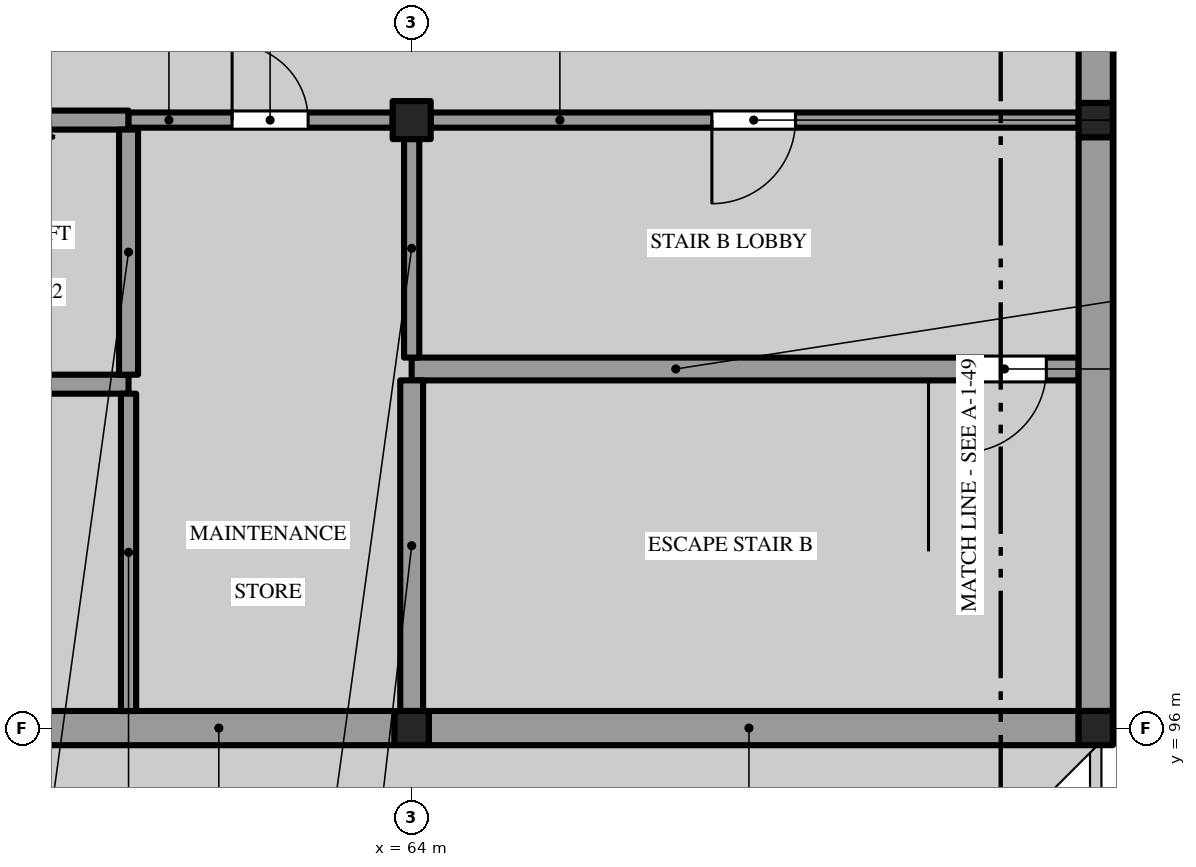
"""IFC4 building model, lengths in metres.
Left out: names, types, materials, properties, quantities, classifications, styles, units other than length and angle.
Written with IfcOpenShell. Run it as: python <this file> out.ifc"""

import sys

from ifc_helpers import new_model, si_unit, direction, frame, frame_2d, origin, origin_2d, place, context, subcontext, project, spatial, polyline, rectangle, outline, extrude, element, fill, save


model = new_model("IFC4")
c1 = context("Model", 3, precision=1e-05, world=origin(), true_north=direction((0.0, 1.0)))
c2 = subcontext(c1, "Body", "Model", "MODEL_VIEW")
j1 = project(units=[si_unit("LENGTHUNIT", "METRE"), si_unit("PLANEANGLEUNIT", "RADIAN")], contexts=[c1])
p1 = place(None, origin())
s1 = spatial("IfcSite", under=j1, at=p1, CompositionType="ELEMENT")
p2 = place(p1, origin())
s2 = spatial("IfcBuilding", under=s1, at=p2, CompositionType="ELEMENT")
p3 = place(p2, frame((0.0, 0.0, 12.0)))
s3 = spatial("IfcBuildingStorey", under=s2, at=p3, CompositionType="ELEMENT", Elevation=12.0)
p4 = place(p3, frame((64.0, 96.0, 0.0), z_axis=(0.0, 0.0, 1.0), x_axis=(1.0, 0.0, 0.0)))
e1 = element("IfcColumn", 1, at=p4, inside=s3, PredefinedType="COLUMN", context=c2, shape_type="SweptSolid", body=[
    extrude(rectangle(XDim=0.45, YDim=0.45, at=origin_2d()), origin(), (0.0, 0.0, 1.0), 4.838),
])
p5 = place(p3, frame((64.0, 104.0, 0.0), z_axis=(0.0, 0.0, 1.0), x_axis=(1.0, 0.0, 0.0)))
e2 = element("IfcColumn", 2, at=p5, inside=s3, PredefinedType="COLUMN", context=c2, shape_type="SweptSolid", body=[
    extrude(rectangle(XDim=0.5, YDim=0.5, at=origin_2d()), origin(), (0.0, 0.0, 1.0), 7.072),
])
p6 = place(p3, frame((73.0, 96.0, 0.0), z_axis=(0.0, 0.0, 1.0), x_axis=(1.0, 0.0, 0.0)))
e3 = element("IfcColumn", 3, at=p6, inside=s3, PredefinedType="COLUMN", context=c2, shape_type="SweptSolid", body=[
    extrude(rectangle(XDim=0.45, YDim=0.45, at=origin_2d()), origin(), (0.0, 0.0, 1.0), 4.838),
])
p7 = place(p3, frame((73.0, 104.0, 0.0), z_axis=(0.0, 0.0, 1.0), x_axis=(1.0, 0.0, 0.0)))
e4 = element("IfcColumn", 4, at=p7, inside=s3, PredefinedType="COLUMN", context=c2, shape_type="SweptSolid", body=[
    extrude(rectangle(XDim=0.45, YDim=0.45, at=origin_2d()), origin(), (0.0, 0.0, 1.0), 7.072),
])
p8 = place(p3, frame((55.225, 96.0, 0.0), z_axis=(0.0, 0.0, 1.0), x_axis=(1.0, 0.0, 0.0)))
e5 = element("IfcWall", 5, at=p8, inside=s3, PredefinedType="SOLIDWALL", context=c2, shape_type="SweptSolid", body=[
    extrude(rectangle(XDim=8.55, YDim=0.45, at=frame_2d((4.275, 0.0))), origin(), (0.0, 0.0, 1.0), 4.688),
])
p9 = place(p8, frame((0.425, 0.0, 1.1)))
e6 = element("IfcOpeningElement", 6, at=p9, cuts=e5, PredefinedType="OPENING", context=c2, shape_type="SweptSolid", body=[
    extrude(rectangle(XDim=3.2, YDim=1.5, at=frame_2d((1.6, 0.75))), frame((0.0, 0.235, 0.0), z_axis=(0.0, -1.0, 0.0), x_axis=(1.0, 0.0, 0.0)), (0.0, 0.0, 1.0), 0.47),
])
p10 = place(p3, frame((64.225, 96.0, 0.0), z_axis=(0.0, 0.0, 1.0), x_axis=(1.0, 0.0, 0.0)))
e7 = element("IfcWall", 7, at=p10, inside=s3, PredefinedType="SOLIDWALL", context=c2, shape_type="SweptSolid", body=[
    extrude(rectangle(XDim=8.55, YDim=0.45, at=frame_2d((4.275, 0.0))), origin(), (0.0, 0.0, 1.0), 4.688),
])
p11 = place(p3, frame((57.125, 100.525, 0.0), z_axis=(0.0, 0.0, 1.0), x_axis=(1.0, 0.0, 0.0)))
e8 = element("IfcWall", 8, at=p11, inside=s3, PredefinedType="SOLIDWALL", context=c2, shape_type="SweptSolid", body=[
    extrude(rectangle(XDim=3.15, YDim=0.25, at=frame_2d((1.575, 0.0))), origin(), (0.0, 0.0, 1.0), 5.985),
])
p12 = place(p3, frame((64.0, 100.725, 0.0), z_axis=(0.0, 0.0, 1.0), x_axis=(1.0, 0.0, 0.0)))
e9 = element("IfcWall", 9, at=p12, inside=s3, PredefinedType="SHEAR", context=c2, shape_type="SweptSolid", body=[
    extrude(rectangle(XDim=8.775, YDim=0.3, at=frame_2d((4.387, 0.0))), origin(), (0.0, 0.0, 1.0), 6.043),
])
p13 = place(p12, frame((7.25, 0.0, 0.0)))
e10 = element("IfcOpeningElement", 10, at=p13, cuts=e9, PredefinedType="OPENING", context=c2, shape_type="SweptSolid", body=[
    extrude(rectangle(XDim=1.1, YDim=2.1, at=frame_2d((0.55, 1.05))), frame((0.0, 0.16, 0.0), z_axis=(0.0, -1.0, 0.0), x_axis=(1.0, 0.0, 0.0)), (0.0, 0.0, 1.0), 0.32),
])
p14 = place(p3, frame((57.125, 104.0, 0.0), z_axis=(0.0, 0.0, 1.0), x_axis=(1.0, 0.0, 0.0)))
e11 = element("IfcWall", 11, at=p14, inside=s3, PredefinedType="SOLIDWALL", context=c2, shape_type="SweptSolid", body=[
    extrude(rectangle(XDim=3.15, YDim=0.25, at=frame_2d((1.575, 0.0))), origin(), (0.0, 0.0, 1.0), 6.922),
])
p15 = place(p14, frame((1.025, 0.0, 0.0)))
e12 = element("IfcOpeningElement", 12, at=p15, cuts=e11, PredefinedType="OPENING", context=c2, shape_type="SweptSolid", body=[
    extrude(rectangle(XDim=1.1, YDim=2.1, at=frame_2d((0.55, 1.05))), frame((0.0, 0.135, 0.0), z_axis=(0.0, -1.0, 0.0), x_axis=(1.0, 0.0, 0.0)), (0.0, 0.0, 1.0), 0.27),
])
p16 = place(p3, frame((60.275, 104.0, 0.0), z_axis=(0.0, 0.0, 1.0), x_axis=(1.0, 0.0, 0.0)))
e13 = element("IfcWall", 13, at=p16, inside=s3, PredefinedType="SOLIDWALL", context=c2, shape_type="SweptSolid", body=[
    extrude(rectangle(XDim=3.475, YDim=0.2, at=frame_2d((1.738, 0.0))), origin(), (0.0, 0.0, 1.0), 6.922),
])
p17 = place(p16, frame((1.363, 0.0, 0.0)))
e14 = element("IfcOpeningElement", 14, at=p17, cuts=e13, PredefinedType="OPENING", context=c2, shape_type="SweptSolid", body=[
    extrude(rectangle(XDim=1.0, YDim=2.1, at=frame_2d((0.5, 1.05))), frame((0.0, 0.11, 0.0), z_axis=(0.0, -1.0, 0.0), x_axis=(1.0, 0.0, 0.0)), (0.0, 0.0, 1.0), 0.22),
])
p18 = place(p3, frame((64.25, 104.0, 0.0), z_axis=(0.0, 0.0, 1.0), x_axis=(1.0, 0.0, 0.0)))
e15 = element("IfcWall", 15, at=p18, inside=s3, PredefinedType="SOLIDWALL", context=c2, shape_type="SweptSolid", body=[
    extrude(rectangle(XDim=8.525, YDim=0.2, at=frame_2d((4.262, 0.0))), origin(), (0.0, 0.0, 1.0), 6.922),
])
p19 = place(p18, frame((3.7, 0.0, 0.0)))
e16 = element("IfcOpeningElement", 16, at=p19, cuts=e15, PredefinedType="OPENING", context=c2, shape_type="SweptSolid", body=[
    extrude(rectangle(XDim=1.1, YDim=2.1, at=frame_2d((0.55, 1.05))), frame((0.0, 0.11, 0.0), z_axis=(0.0, -1.0, 0.0), x_axis=(1.0, 0.0, 0.0)), (0.0, 0.0, 1.0), 0.22),
])
p20 = place(p3, frame((60.275, 96.225, 0.0), z_axis=(0.0, 0.0, 1.0), x_axis=(0.0, 1.0, 0.0)))
e17 = element("IfcWall", 17, at=p20, inside=s3, PredefinedType="SOLIDWALL", context=c2, shape_type="SweptSolid", body=[
    extrude(outline(polyline([(0.0, 0.0), (4.175, 0.0), (4.175, 5.95), (0.0, 4.752), (0.0, 0.0)])), frame((0.0, 0.1, 0.0), z_axis=(0.0, -1.0, 0.0), x_axis=(1.0, 0.0, 0.0)), (0.0, 0.0, 1.0), 0.2),
])
p21 = place(p3, frame((60.275, 100.65, 0.0), z_axis=(0.0, 0.0, 1.0), x_axis=(0.0, 1.0, 0.0)))
e18 = element("IfcWall", 18, at=p21, inside=s3, PredefinedType="SOLIDWALL", context=c2, shape_type="SweptSolid", body=[
    extrude(outline(polyline([(0.0, 0.0), (3.225, 0.0), (3.225, 6.946), (0.0, 6.021), (0.0, 0.0)])), frame((0.0, 0.125, 0.0), z_axis=(0.0, -1.0, 0.0), x_axis=(1.0, 0.0, 0.0)), (0.0, 0.0, 1.0), 0.25),
])
p22 = place(p3, frame((64.0, 96.225, 0.0), z_axis=(0.0, 0.0, 1.0), x_axis=(0.0, 1.0, 0.0)))
e19 = element("IfcWall", 19, at=p22, inside=s3, PredefinedType="SHEAR", context=c2, shape_type="SweptSolid", body=[
    extrude(outline(polyline([(0.0, 0.0), (4.35, 0.0), (4.35, 6.0), (0.0, 4.752), (0.0, 0.0)])), frame((0.0, 0.15, 0.0), z_axis=(0.0, -1.0, 0.0), x_axis=(1.0, 0.0, 0.0)), (0.0, 0.0, 1.0), 0.3),
])
p23 = place(p3, frame((64.0, 100.875, 0.0), z_axis=(0.0, 0.0, 1.0), x_axis=(0.0, 1.0, 0.0)))
e20 = element("IfcWall", 20, at=p23, inside=s3, PredefinedType="SOLIDWALL", context=c2, shape_type="SweptSolid", body=[
    extrude(outline(polyline([(0.0, 0.0), (2.875, 0.0), (2.875, 6.91), (0.0, 6.086), (0.0, 0.0)])), frame((0.0, 0.1, 0.0), z_axis=(0.0, -1.0, 0.0), x_axis=(1.0, 0.0, 0.0)), (0.0, 0.0, 1.0), 0.2),
])
p24 = place(p3, frame((73.0, 96.225, 0.0), z_axis=(0.0, 0.0, 1.0), x_axis=(0.0, 1.0, 0.0)))
e21 = element("IfcWall", 21, at=p24, inside=s3, PredefinedType="SOLIDWALL", context=c2, shape_type="SweptSolid", body=[
    extrude(outline(polyline([(0.0, 0.0), (7.55, 0.0), (7.55, 6.917), (0.0, 4.752), (0.0, 0.0)])), frame((0.0, 0.225, 0.0), z_axis=(0.0, -1.0, 0.0), x_axis=(1.0, 0.0, 0.0)), (0.0, 0.0, 1.0), 0.45),
])
p25 = place(p3, frame((73.0, 104.225, 0.0), z_axis=(0.0, 0.0, 1.0), x_axis=(0.0, 1.0, 0.0)))
e22 = element("IfcWall", 22, at=p25, inside=s3, PredefinedType="SOLIDWALL", context=c2, shape_type="SweptSolid", body=[
    extrude(outline(polyline([(0.0, 0.0), (7.55, 0.0), (7.55, 4.752), (0.0, 6.917), (0.0, 0.0)])), frame((0.0, 0.225, 0.0), z_axis=(0.0, -1.0, 0.0), x_axis=(1.0, 0.0, 0.0)), (0.0, 0.0, 1.0), 0.45),
])
p26 = place(p25, frame((4.925, 0.0, 0.0)))
e23 = element("IfcOpeningElement", 23, at=p26, cuts=e22, PredefinedType="OPENING", context=c2, shape_type="SweptSolid", body=[
    extrude(rectangle(XDim=1.5, YDim=2.1, at=frame_2d((0.75, 1.05))), frame((0.0, 0.235, 0.0), z_axis=(0.0, -1.0, 0.0), x_axis=(1.0, 0.0, 0.0)), (0.0, 0.0, 1.0), 0.47),
])
p27 = place(p19, frame((1.1, 0.0, 0.0), z_axis=(0.0, 0.0, 1.0), x_axis=(-1.0, 0.0, 0.0)))
e24 = element("IfcDoor", 24, at=p27, inside=s3, OperationType="SINGLE_SWING_RIGHT", PredefinedType="DOOR", context=c2, shape_type="SweptSolid", body=[
    extrude(rectangle(XDim=1.1, YDim=2.1, at=frame_2d((0.55, 1.05))), frame((0.0, 0.025, 0.0), z_axis=(0.0, -1.0, 0.0), x_axis=(1.0, 0.0, 0.0)), (0.0, 0.0, 1.0), 0.05),
])
fill(e16, e24)
p28 = place(p13, frame((1.1, 0.0, 0.0), z_axis=(0.0, 0.0, 1.0), x_axis=(-1.0, 0.0, 0.0)))
e25 = element("IfcDoor", 25, at=p28, inside=s3, OperationType="SINGLE_SWING_LEFT", PredefinedType="DOOR", context=c2, shape_type="SweptSolid", body=[
    extrude(rectangle(XDim=1.1, YDim=2.1, at=frame_2d((0.55, 1.05))), frame((0.0, 0.025, 0.0), z_axis=(0.0, -1.0, 0.0), x_axis=(1.0, 0.0, 0.0)), (0.0, 0.0, 1.0), 0.05),
])
fill(e10, e25)
p29 = place(p17, origin())
e26 = element("IfcDoor", 26, at=p29, inside=s3, OperationType="SINGLE_SWING_RIGHT", PredefinedType="DOOR", context=c2, shape_type="SweptSolid", body=[
    extrude(rectangle(XDim=1.0, YDim=2.1, at=frame_2d((0.5, 1.05))), frame((0.0, 0.025, 0.0), z_axis=(0.0, -1.0, 0.0), x_axis=(1.0, 0.0, 0.0)), (0.0, 0.0, 1.0), 0.05),
])
fill(e14, e26)
save(model, sys.argv[1])
